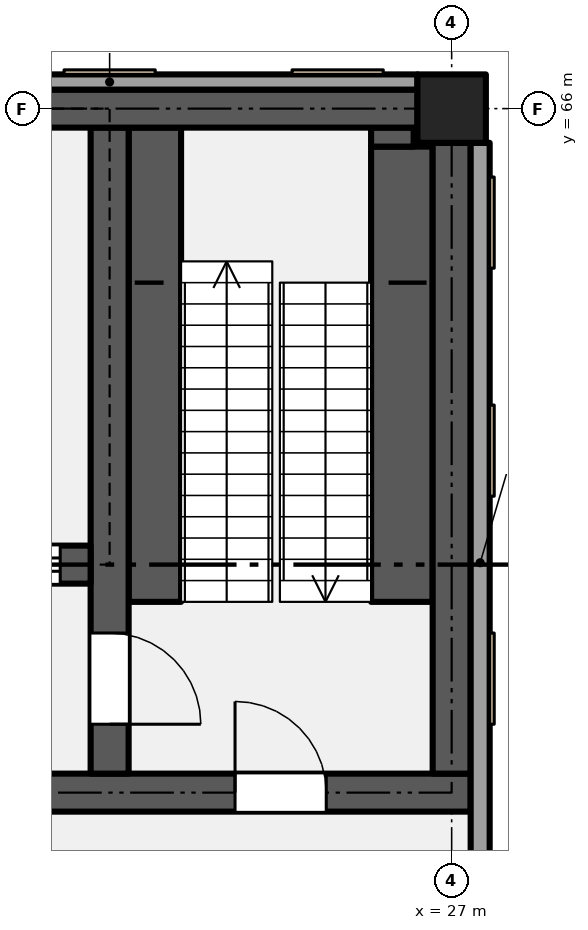
"""IFC4 building model, lengths in metres.
Left out: names, types, materials, properties, quantities, classifications, styles, units other than length and angle.
Written with IfcOpenShell. Run it as: python <this file> out.ifc"""

import sys

from ifc_helpers import new_model, si_unit, direction, frame, frame_2d, origin, origin_2d, place, context, subcontext, project, spatial, rectangle, extrude, element, fill, save


model = new_model("IFC4")
c1 = context("Model", 3, precision=1e-05, world=origin(), true_north=direction((0.0, 1.0)))
c2 = subcontext(c1, "Body", "Model", "MODEL_VIEW")
j1 = project(units=[si_unit("LENGTHUNIT", "METRE"), si_unit("PLANEANGLEUNIT", "RADIAN")], contexts=[c1])
p1 = place(None, origin())
s1 = spatial("IfcSite", under=j1, at=p1, CompositionType="ELEMENT")
p2 = place(p1, origin())
s2 = spatial("IfcBuilding", under=s1, at=p2, CompositionType="ELEMENT")
p3 = place(p2, frame((0.0, 0.0, 6.6)))
s3 = spatial("IfcBuildingStorey", under=s2, at=p3, CompositionType="ELEMENT", Elevation=6.6)
p4 = place(p3, frame((27.0, 66.0, 0.0), z_axis=(0.0, 0.0, 1.0), x_axis=(1.0, 0.0, 0.0)))
e1 = element("IfcColumn", 1, at=p4, inside=s3, PredefinedType="COLUMN", context=c2, shape_type="SweptSolid", body=[
    extrude(rectangle(XDim=0.9, YDim=0.9, at=origin_2d()), origin(), (0.0, 0.0, 1.0), 5.4),
])
p5 = place(p3, frame((17.75, 57.0, 0.0), z_axis=(0.0, 0.0, 1.0), x_axis=(1.0, 0.0, 0.0)))
e2 = element("IfcWall", 2, at=p5, inside=s3, PredefinedType="SHEAR", context=c2, shape_type="SweptSolid", body=[
    extrude(rectangle(XDim=9.5, YDim=0.5, at=frame_2d((4.75, 0.0))), origin(), (0.0, 0.0, 1.0), 5.1),
])
p6 = place(p5, frame((3.1, 0.0, 0.0), z_axis=(0.0, 0.0, 1.0), x_axis=(-1.0, 0.0, 0.0)))
e3 = element("IfcOpeningElement", 3, at=p6, cuts=e2, PredefinedType="OPENING", context=c2, shape_type="SweptSolid", body=[
    extrude(rectangle(XDim=1.2, YDim=2.1, at=frame_2d((0.6, 1.05))), frame((0.0, 0.26, 0.0), z_axis=(0.0, -1.0, 0.0), x_axis=(1.0, 0.0, 0.0)), (0.0, 0.0, 1.0), 0.52),
])
p7 = place(p5, frame((6.4, 0.0, 0.0)))
e4 = element("IfcOpeningElement", 4, at=p7, cuts=e2, PredefinedType="OPENING", context=c2, shape_type="SweptSolid", body=[
    extrude(rectangle(XDim=1.2, YDim=2.1, at=frame_2d((0.6, 1.05))), frame((0.0, 0.26, 0.0), z_axis=(0.0, -1.0, 0.0), x_axis=(1.0, 0.0, 0.0)), (0.0, 0.0, 1.0), 0.52),
])
p8 = place(p3, frame((22.5, 57.25, 0.0), z_axis=(0.0, 0.0, 1.0), x_axis=(0.0, 1.0, 0.0)))
e5 = element("IfcWall", 5, at=p8, inside=s3, PredefinedType="SHEAR", context=c2, shape_type="SweptSolid", body=[
    extrude(rectangle(XDim=8.5, YDim=0.5, at=frame_2d((4.25, 0.0))), origin(), (0.0, 0.0, 1.0), 5.1),
])
p9 = place(p8, frame((1.85, 0.0, 0.0), z_axis=(0.0, 0.0, 1.0), x_axis=(-1.0, 0.0, 0.0)))
e6 = element("IfcOpeningElement", 6, at=p9, cuts=e5, PredefinedType="OPENING", context=c2, shape_type="SweptSolid", body=[
    extrude(rectangle(XDim=1.2, YDim=2.1, at=frame_2d((0.6, 1.05))), frame((0.0, 0.26, 0.0), z_axis=(0.0, -1.0, 0.0), x_axis=(1.0, 0.0, 0.0)), (0.0, 0.0, 1.0), 0.52),
])
p10 = place(p3, frame((27.0, 57.25, 0.0), z_axis=(0.0, 0.0, 1.0), x_axis=(0.0, 1.0, 0.0)))
e7 = element("IfcWall", 7, at=p10, inside=s3, PredefinedType="SHEAR", context=c2, shape_type="SweptSolid", body=[
    extrude(rectangle(XDim=8.3, YDim=0.5, at=frame_2d((4.15, 0.0))), origin(), (0.0, 0.0, 1.0), 5.1),
])
p11 = place(p3, frame((18.25, 60.0, 0.0), z_axis=(0.0, 0.0, 1.0), x_axis=(1.0, 0.0, 0.0)))
e8 = element("IfcWall", 8, at=p11, inside=s3, PredefinedType="SHEAR", context=c2, shape_type="SweptSolid", body=[
    extrude(rectangle(XDim=4.0, YDim=0.5, at=frame_2d((2.0, 0.0))), origin(), (0.0, 0.0, 1.0), 5.1),
])
p12 = place(p11, frame((0.35, 0.0, 0.0)))
e9 = element("IfcOpeningElement", 9, at=p12, cuts=e8, PredefinedType="OPENING", context=c2, shape_type="SweptSolid", body=[
    extrude(rectangle(XDim=1.1, YDim=2.1, at=frame_2d((0.55, 1.05))), frame((0.0, 0.26, 0.0), z_axis=(0.0, -1.0, 0.0), x_axis=(1.0, 0.0, 0.0)), (0.0, 0.0, 1.0), 0.52),
])
p13 = place(p11, frame((2.5, 0.0, 0.0)))
e10 = element("IfcOpeningElement", 10, at=p13, cuts=e8, PredefinedType="OPENING", context=c2, shape_type="SweptSolid", body=[
    extrude(rectangle(XDim=1.1, YDim=2.1, at=frame_2d((0.55, 1.05))), frame((0.0, 0.26, 0.0), z_axis=(0.0, -1.0, 0.0), x_axis=(1.0, 0.0, 0.0)), (0.0, 0.0, 1.0), 0.52),
])
p14 = place(p3, frame((18.45, 66.0, 0.0), z_axis=(0.0, 0.0, 1.0), x_axis=(1.0, 0.0, 0.0)))
e11 = element("IfcWall", 11, at=p14, inside=s3, PredefinedType="SHEAR", context=c2, shape_type="SweptSolid", body=[
    extrude(rectangle(XDim=8.1, YDim=0.5, at=frame_2d((4.05, 0.0))), origin(), (0.0, 0.0, 1.0), 5.1),
])
p15 = place(p3, frame((18.45, 66.35, 0.0), z_axis=(0.0, 0.0, 1.0), x_axis=(1.0, 0.0, 0.0)))
e12 = element("IfcWall", 12, at=p15, inside=s3, PredefinedType="SOLIDWALL", context=c2, shape_type="SweptSolid", body=[
    extrude(rectangle(XDim=8.1, YDim=0.2, at=frame_2d((4.05, 0.0))), origin(), (0.0, 0.0, 1.0), 5.1),
])
p16 = place(p3, frame((27.375, 54.5, 0.0), z_axis=(0.0, 0.0, 1.0), x_axis=(0.0, 1.0, 0.0)))
e13 = element("IfcWall", 13, at=p16, inside=s3, PredefinedType="SOLIDWALL", context=c2, shape_type="SweptSolid", body=[
    extrude(rectangle(XDim=11.05, YDim=0.25, at=frame_2d((5.525, 0.0))), origin(), (0.0, 0.0, 1.0), 5.1),
])
p17 = place(p16, frame((0.4, 0.0, 0.9)))
e14 = element("IfcOpeningElement", 14, at=p17, cuts=e13, PredefinedType="OPENING", context=c2, shape_type="SweptSolid", body=[
    extrude(rectangle(XDim=1.2, YDim=2.4, at=frame_2d((0.6, 1.2))), frame((0.0, 0.135, 0.0), z_axis=(0.0, -1.0, 0.0), x_axis=(1.0, 0.0, 0.0)), (0.0, 0.0, 1.0), 0.27),
])
p18 = place(p3, frame((23.095, 59.51, 0.0), z_axis=(0.0, 0.0, 1.0), x_axis=(0.0, 1.0, 0.0)))
e15 = element("IfcWall", 15, at=p18, inside=s3, PredefinedType="SHEAR", context=c2, shape_type="SweptSolid", body=[
    extrude(rectangle(XDim=6.24, YDim=0.69, at=frame_2d((3.12, 0.0))), origin(), (0.0, 0.0, 1.0), 2.587),
])
p19 = place(p3, frame((26.345, 59.51, 0.0), z_axis=(0.0, 0.0, 1.0), x_axis=(0.0, 1.0, 0.0)))
e16 = element("IfcWall", 16, at=p19, inside=s3, PredefinedType="SHEAR", context=c2, shape_type="SweptSolid", body=[
    extrude(rectangle(XDim=5.99, YDim=0.81, at=frame_2d((2.995, 0.0))), origin(), (0.0, 0.0, 1.0), 2.587),
])
p20 = place(p3, frame((26.22, 65.5, 0.0), z_axis=(0.0, 0.0, 1.0), x_axis=(0.0, 1.0, 0.0)))
e17 = element("IfcWall", 17, at=p20, inside=s3, PredefinedType="SHEAR", context=c2, shape_type="SweptSolid", body=[
    extrude(rectangle(XDim=0.25, YDim=0.56, at=frame_2d((0.125, 0.0))), origin(), (0.0, 0.0, 1.0), 2.587),
])
p21 = place(p13, origin())
e18 = element("IfcDoor", 18, at=p21, inside=s3, OperationType="SLIDING_TO_LEFT", PredefinedType="DOOR", context=c2, shape_type="SweptSolid", body=[
    extrude(rectangle(XDim=1.1, YDim=2.1, at=frame_2d((0.55, 1.05))), frame((0.0, 0.025, 0.0), z_axis=(0.0, -1.0, 0.0), x_axis=(1.0, 0.0, 0.0)), (0.0, 0.0, 1.0), 0.05),
])
fill(e10, e18)
p22 = place(p9, origin())
e19 = element("IfcDoor", 19, at=p22, inside=s3, OperationType="SINGLE_SWING_RIGHT", PredefinedType="DOOR", context=c2, shape_type="SweptSolid", body=[
    extrude(rectangle(XDim=1.2, YDim=2.1, at=frame_2d((0.6, 1.05))), frame((0.0, 0.025, 0.0), z_axis=(0.0, -1.0, 0.0), x_axis=(1.0, 0.0, 0.0)), (0.0, 0.0, 1.0), 0.05),
])
fill(e6, e19)
p23 = place(p7, origin())
e20 = element("IfcDoor", 20, at=p23, inside=s3, OperationType="SINGLE_SWING_LEFT", PredefinedType="DOOR", context=c2, shape_type="SweptSolid", body=[
    extrude(rectangle(XDim=1.2, YDim=2.1, at=frame_2d((0.6, 1.05))), frame((0.0, 0.025, 0.0), z_axis=(0.0, -1.0, 0.0), x_axis=(1.0, 0.0, 0.0)), (0.0, 0.0, 1.0), 0.05),
])
fill(e4, e20)
save(model, sys.argv[1])
